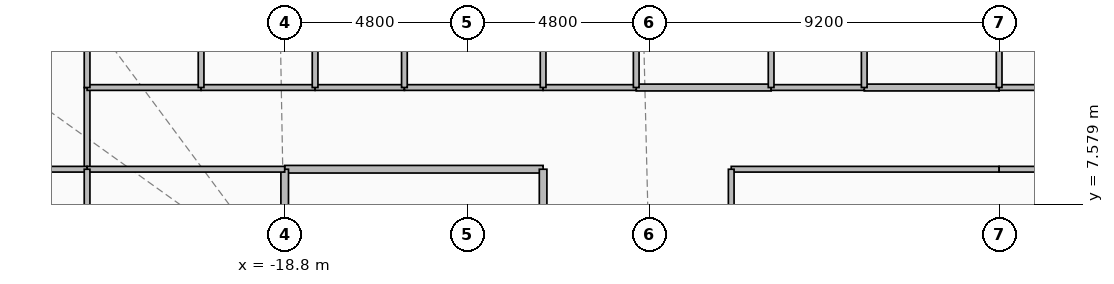
"""IFC4 building model, lengths in metres.
Left out: names, types, materials, properties, quantities, classifications, styles, units other than length and angle.
Written with IfcOpenShell. Run it as: python <this file> out.ifc"""

import sys

from ifc_helpers import new_model, si_unit, direction, frame, frame_2d, origin, place, context, subcontext, project, spatial, rectangle, extrude, element, fill, save


model = new_model("IFC4")
c1 = context("Model", 3, precision=1e-05, world=origin(), true_north=direction((0.0, 1.0)))
c2 = subcontext(c1, "Body", "Model", "MODEL_VIEW")
j1 = project(units=[si_unit("LENGTHUNIT", "METRE"), si_unit("PLANEANGLEUNIT", "RADIAN")], contexts=[c1])
p1 = place(None, origin())
s1 = spatial("IfcSite", under=j1, at=p1, CompositionType="ELEMENT")
p2 = place(p1, origin())
s2 = spatial("IfcBuilding", under=s1, at=p2, CompositionType="ELEMENT")
p3 = place(p2, frame((0.0, 0.0, 22.5)))
s3 = spatial("IfcBuildingStorey", under=s2, at=p3, CompositionType="ELEMENT", Elevation=22.5)
p4 = place(p3, frame((-12.0, 8.5, 0.0), z_axis=(0.0, 0.0, 1.0), x_axis=(-1.0, 0.0, 0.0)))
e1 = element("IfcWall", 1, at=p4, inside=s3, PredefinedType="PARTITIONING", context=c2, shape_type="SweptSolid", body=[
    extrude(rectangle(XDim=6.8, YDim=0.2, at=frame_2d((3.4, 0.0))), origin(), (0.0, 0.0, 1.0), 4.16),
])
p5 = place(p4, frame((1.715, 0.0, 0.0)))
e2 = element("IfcOpeningElement", 2, at=p5, cuts=e1, PredefinedType="OPENING", context=c2, shape_type="SweptSolid", body=[
    extrude(rectangle(XDim=1.1, YDim=2.15, at=frame_2d((0.55, 1.075))), frame((0.0, 0.11, 0.0), z_axis=(0.0, -1.0, 0.0), x_axis=(1.0, 0.0, 0.0)), (0.0, 0.0, 1.0), 0.22),
])
p6 = place(p3, frame((-12.0, 5.6, 0.0), z_axis=(0.0, 0.0, 1.0), x_axis=(0.0, 1.0, 0.0)))
e3 = element("IfcWall", 3, at=p6, inside=s3, PredefinedType="PARTITIONING", context=c2, shape_type="SweptSolid", body=[
    extrude(rectangle(XDim=2.9, YDim=0.2, at=frame_2d((1.45, 0.0))), origin(), (0.0, 0.0, 1.0), 4.16),
])
p7 = place(p3, frame((-18.8, 8.5, 0.0), z_axis=(0.0, 0.0, 1.0), x_axis=(0.0, -1.0, 0.0)))
e4 = element("IfcWall", 4, at=p7, inside=s3, PredefinedType="PARTITIONING", context=c2, shape_type="SweptSolid", body=[
    extrude(rectangle(XDim=2.9, YDim=0.2, at=frame_2d((1.45, 0.0))), origin(), (0.0, 0.0, 1.0), 3.645),
])
p8 = place(p3, frame((-24.0, 8.5, 0.0), z_axis=(0.0, 0.0, 1.0), x_axis=(0.0, 1.0, 0.0)))
e5 = element("IfcWall", 5, at=p8, inside=s3, PredefinedType="PARTITIONING", context=c2, shape_type="SweptSolid", body=[
    extrude(rectangle(XDim=2.15, YDim=0.15, at=frame_2d((1.075, 0.0))), origin(), (0.0, 0.0, 1.0), 4.16),
])
p9 = place(p8, frame((0.625, 0.0, 0.0)))
e6 = element("IfcOpeningElement", 6, at=p9, cuts=e5, PredefinedType="OPENING", context=c2, shape_type="SweptSolid", body=[
    extrude(rectangle(XDim=0.9, YDim=2.1, at=frame_2d((0.45, 1.05))), frame((0.0, 0.085, 0.0), z_axis=(0.0, -1.0, 0.0), x_axis=(1.0, 0.0, 0.0)), (0.0, 0.0, 1.0), 0.17),
])
p10 = place(p3, frame((-18.8, 8.5, 0.0), z_axis=(0.0, 0.0, 1.0), x_axis=(-1.0, 0.0, 0.0)))
e7 = element("IfcWall", 7, at=p10, inside=s3, PredefinedType="PARTITIONING", context=c2, shape_type="SweptSolid", body=[
    extrude(rectangle(XDim=5.2, YDim=0.15, at=frame_2d((2.6, 0.0))), origin(), (0.0, 0.0, 1.0), 4.16),
])
p11 = place(p10, frame((3.196, 0.0, 0.0)))
e8 = element("IfcOpeningElement", 8, at=p11, cuts=e7, PredefinedType="OPENING", context=c2, shape_type="SweptSolid", body=[
    extrude(rectangle(XDim=1.05, YDim=2.15, at=frame_2d((0.525, 1.075))), frame((0.0, 0.085, 0.0), z_axis=(0.0, -1.0, 0.0), x_axis=(1.0, 0.0, 0.0)), (0.0, 0.0, 1.0), 0.17),
])
p12 = place(p3, frame((-24.0, 10.65, 0.0), z_axis=(0.0, 0.0, 1.0), x_axis=(1.0, 0.0, 0.0)))
e9 = element("IfcWall", 9, at=p12, inside=s3, PredefinedType="PARTITIONING", context=c2, shape_type="SweptSolid", body=[
    extrude(rectangle(XDim=3.0, YDim=0.15, at=frame_2d((1.5, 0.0))), origin(), (0.0, 0.0, 1.0), 4.16),
])
p13 = place(p12, frame((0.679, 0.0, 0.0)))
e10 = element("IfcOpeningElement", 10, at=p13, cuts=e9, PredefinedType="OPENING", context=c2, shape_type="SweptSolid", body=[
    extrude(rectangle(XDim=1.05, YDim=2.15, at=frame_2d((0.525, 1.075))), frame((0.0, 0.085, 0.0), z_axis=(0.0, -1.0, 0.0), x_axis=(1.0, 0.0, 0.0)), (0.0, 0.0, 1.0), 0.17),
])
p14 = place(p3, frame((-21.0, 10.65, 0.0), z_axis=(0.0, 0.0, 1.0), x_axis=(1.0, 0.0, 0.0)))
e11 = element("IfcWall", 11, at=p14, inside=s3, PredefinedType="PARTITIONING", context=c2, shape_type="SweptSolid", body=[
    extrude(rectangle(XDim=3.0, YDim=0.15, at=frame_2d((1.5, 0.0))), origin(), (0.0, 0.0, 1.0), 4.16),
])
p15 = place(p14, frame((0.679, 0.0, 0.0)))
e12 = element("IfcOpeningElement", 12, at=p15, cuts=e11, PredefinedType="OPENING", context=c2, shape_type="SweptSolid", body=[
    extrude(rectangle(XDim=1.05, YDim=2.15, at=frame_2d((0.525, 1.075))), frame((0.0, 0.085, 0.0), z_axis=(0.0, -1.0, 0.0), x_axis=(1.0, 0.0, 0.0)), (0.0, 0.0, 1.0), 0.17),
])
p16 = place(p3, frame((-18.0, 10.65, 0.0), z_axis=(0.0, 0.0, 1.0), x_axis=(1.0, 0.0, 0.0)))
e13 = element("IfcWall", 13, at=p16, inside=s3, PredefinedType="PLUMBINGWALL", context=c2, shape_type="SweptSolid", body=[
    extrude(rectangle(XDim=2.35, YDim=0.15, at=frame_2d((1.175, 0.0))), origin(), (0.0, 0.0, 1.0), 4.16),
])
p17 = place(p16, frame((0.834, 0.0, 0.0)))
e14 = element("IfcOpeningElement", 14, at=p17, cuts=e13, PredefinedType="OPENING", context=c2, shape_type="SweptSolid", body=[
    extrude(rectangle(XDim=0.9, YDim=2.1, at=frame_2d((0.45, 1.05))), frame((0.0, 0.085, 0.0), z_axis=(0.0, -1.0, 0.0), x_axis=(1.0, 0.0, 0.0)), (0.0, 0.0, 1.0), 0.17),
])
p18 = place(p3, frame((-15.65, 10.65, 0.0), z_axis=(0.0, 0.0, 1.0), x_axis=(1.0, 0.0, 0.0)))
e15 = element("IfcWall", 15, at=p18, inside=s3, PredefinedType="PARTITIONING", context=c2, shape_type="SweptSolid", body=[
    extrude(rectangle(XDim=3.65, YDim=0.15, at=frame_2d((1.825, 0.0))), origin(), (0.0, 0.0, 1.0), 4.16),
])
p19 = place(p18, frame((1.157, 0.0, 0.0)))
e16 = element("IfcOpeningElement", 16, at=p19, cuts=e15, PredefinedType="OPENING", context=c2, shape_type="SweptSolid", body=[
    extrude(rectangle(XDim=0.95, YDim=2.1, at=frame_2d((0.475, 1.05))), frame((0.0, 0.085, 0.0), z_axis=(0.0, -1.0, 0.0), x_axis=(1.0, 0.0, 0.0)), (0.0, 0.0, 1.0), 0.17),
])
p20 = place(p3, frame((-9.55, 10.65, 0.0), z_axis=(0.0, 0.0, 1.0), x_axis=(1.0, 0.0, 0.0)))
e17 = element("IfcWall", 17, at=p20, inside=s3, PredefinedType="PARTITIONING", context=c2, shape_type="SweptSolid", body=[
    extrude(rectangle(XDim=3.55, YDim=0.18, at=frame_2d((1.775, 0.0))), origin(), (0.0, 0.0, 1.0), 4.16),
])
p21 = place(p20, frame((1.796, 0.0, 0.0)))
e18 = element("IfcOpeningElement", 18, at=p21, cuts=e17, PredefinedType="OPENING", context=c2, shape_type="SweptSolid", body=[
    extrude(rectangle(XDim=1.0, YDim=2.15, at=frame_2d((0.5, 1.075))), frame((0.0, 0.1, 0.0), z_axis=(0.0, -1.0, 0.0), x_axis=(1.0, 0.0, 0.0)), (0.0, 0.0, 1.0), 0.2),
])
p22 = place(p3, frame((-12.0, 10.65, 0.0), z_axis=(0.0, 0.0, 1.0), x_axis=(1.0, 0.0, 0.0)))
e19 = element("IfcWall", 19, at=p22, inside=s3, PredefinedType="PLUMBINGWALL", context=c2, shape_type="SweptSolid", body=[
    extrude(rectangle(XDim=2.45, YDim=0.15, at=frame_2d((1.225, 0.0))), origin(), (0.0, 0.0, 1.0), 4.16),
])
p23 = place(p3, frame((-3.55, 10.65, 0.0), z_axis=(0.0, 0.0, 1.0), x_axis=(1.0, 0.0, 0.0)))
e20 = element("IfcWall", 20, at=p23, inside=s3, PredefinedType="PARTITIONING", context=c2, shape_type="SweptSolid", body=[
    extrude(rectangle(XDim=3.55, YDim=0.18, at=frame_2d((1.775, 0.0))), origin(), (0.0, 0.0, 1.0), 4.16),
])
p24 = place(p23, frame((1.275, 0.0, 0.0)))
e21 = element("IfcOpeningElement", 21, at=p24, cuts=e20, PredefinedType="OPENING", context=c2, shape_type="SweptSolid", body=[
    extrude(rectangle(XDim=1.0, YDim=2.15, at=frame_2d((0.5, 1.075))), frame((0.0, 0.1, 0.0), z_axis=(0.0, -1.0, 0.0), x_axis=(1.0, 0.0, 0.0)), (0.0, 0.0, 1.0), 0.2),
])
p25 = place(p3, frame((-6.0, 10.65, 0.0), z_axis=(0.0, 0.0, 1.0), x_axis=(1.0, 0.0, 0.0)))
e22 = element("IfcWall", 22, at=p25, inside=s3, PredefinedType="PLUMBINGWALL", context=c2, shape_type="SweptSolid", body=[
    extrude(rectangle(XDim=2.45, YDim=0.15, at=frame_2d((1.225, 0.0))), origin(), (0.0, 0.0, 1.0), 4.16),
])
p26 = place(p3, frame((0.0, 8.5, 0.0), z_axis=(0.0, 0.0, 1.0), x_axis=(-1.0, 0.0, 0.0)))
e23 = element("IfcWall", 23, at=p26, inside=s3, PredefinedType="PARTITIONING", context=c2, shape_type="SweptSolid", body=[
    extrude(rectangle(XDim=7.05, YDim=0.15, at=frame_2d((3.525, 0.0))), origin(), (0.0, 0.0, 1.0), 4.16),
])
p27 = place(p3, frame((0.0, 10.65, 0.0), z_axis=(0.0, 0.0, 1.0), x_axis=(1.0, 0.0, 0.0)))
e24 = element("IfcWall", 24, at=p27, inside=s3, PredefinedType="PLUMBINGWALL", context=c2, shape_type="SweptSolid", body=[
    extrude(rectangle(XDim=2.45, YDim=0.15, at=frame_2d((1.225, 0.0))), origin(), (0.0, 0.0, 1.0), 4.16),
])
p28 = place(p3, frame((7.05, 8.5, 0.0), z_axis=(0.0, 0.0, 1.0), x_axis=(-1.0, 0.0, 0.0)))
e25 = element("IfcWall", 25, at=p28, inside=s3, PredefinedType="PARTITIONING", context=c2, shape_type="SweptSolid", body=[
    extrude(rectangle(XDim=7.05, YDim=0.15, at=frame_2d((3.525, 0.0))), origin(), (0.0, 0.0, 1.0), 4.16),
])
p29 = place(p3, frame((-7.05, 8.5, 0.0), z_axis=(0.0, 0.0, 1.0), x_axis=(0.0, -1.0, 0.0)))
e26 = element("IfcWall", 26, at=p29, inside=s3, PredefinedType="PARTITIONING", context=c2, shape_type="SweptSolid", body=[
    extrude(rectangle(XDim=14.1, YDim=0.15, at=frame_2d((7.05, 0.0))), origin(), (0.0, 0.0, 1.0), 4.16),
])
p30 = place(p29, frame((8.011, 0.0, 0.0)))
e27 = element("IfcOpeningElement", 27, at=p30, cuts=e26, PredefinedType="OPENING", context=c2, shape_type="SweptSolid", body=[
    extrude(rectangle(XDim=1.05, YDim=2.15, at=frame_2d((0.525, 1.075))), frame((0.0, 0.085, 0.0), z_axis=(0.0, -1.0, 0.0), x_axis=(1.0, 0.0, 0.0)), (0.0, 0.0, 1.0), 0.17),
])
p31 = place(p3, frame((-26.65, 8.5, 0.0), z_axis=(0.0, 0.0, 1.0), x_axis=(1.0, 0.0, 0.0)))
e28 = element("IfcWall", 28, at=p31, inside=s3, PredefinedType="PARTITIONING", context=c2, shape_type="SweptSolid", body=[
    extrude(rectangle(XDim=2.65, YDim=0.15, at=frame_2d((1.325, 0.0))), origin(), (0.0, 0.0, 1.0), 4.16),
])
p32 = place(p31, frame((0.635, 0.0, 0.0)))
e29 = element("IfcOpeningElement", 29, at=p32, cuts=e28, PredefinedType="OPENING", context=c2, shape_type="SweptSolid", body=[
    extrude(rectangle(XDim=1.05, YDim=2.15, at=frame_2d((0.525, 1.075))), frame((0.0, 0.085, 0.0), z_axis=(0.0, -1.0, 0.0), x_axis=(1.0, 0.0, 0.0)), (0.0, 0.0, 1.0), 0.17),
])
p33 = place(p3, frame((-24.0, 8.5, 0.0), z_axis=(0.0, 0.0, 1.0), x_axis=(0.0, -1.0, 0.0)))
e30 = element("IfcWall", 30, at=p33, inside=s3, PredefinedType="PARTITIONING", context=c2, shape_type="SweptSolid", body=[
    extrude(rectangle(XDim=14.1, YDim=0.15, at=frame_2d((7.05, 0.0))), origin(), (0.0, 0.0, 1.0), 4.16),
])
for number, where, z_axis, x_axis in (
    (31, (-24.0, 24.8, 0.0), (0.0, 0.0, 1.0), (0.0, -1.0, 0.0)),
    (32, (-21.0, 24.8, 0.0), (0.0, 0.0, 1.0), (0.0, -1.0, 0.0)),
):
    element("IfcWall", number, at=place(p3, frame(where, z_axis=z_axis, x_axis=x_axis)), inside=s3, PredefinedType="PARTITIONING", context=c2, shape_type="SweptSolid", body=[
        extrude(rectangle(XDim=14.15, YDim=0.15, at=frame_2d((7.075, 0.0))), origin(), (0.0, 0.0, 1.0), 4.16),
    ])
for number, where, z_axis, x_axis in (
    (33, (-18.0, 24.8, 0.0), (0.0, 0.0, 1.0), (0.0, -1.0, 0.0)),
    (34, (-15.65, 24.8, 0.0), (0.0, 0.0, 1.0), (0.0, -1.0, 0.0)),
):
    element("IfcWall", number, at=place(p3, frame(where, z_axis=z_axis, x_axis=x_axis)), inside=s3, PredefinedType="PLUMBINGWALL", context=c2, shape_type="SweptSolid", body=[
        extrude(rectangle(XDim=14.15, YDim=0.15, at=frame_2d((7.075, 0.0))), origin(), (0.0, 0.0, 1.0), 4.16),
    ])
p34 = place(p3, frame((-12.0, 12.8, 0.0), z_axis=(0.0, 0.0, 1.0), x_axis=(0.0, -1.0, 0.0)))
e35 = element("IfcWall", 35, at=p34, inside=s3, PredefinedType="PLUMBINGWALL", context=c2, shape_type="SweptSolid", body=[
    extrude(rectangle(XDim=2.15, YDim=0.15, at=frame_2d((1.075, 0.0))), origin(), (0.0, 0.0, 1.0), 4.16),
])
p35 = place(p3, frame((-9.55, 10.65, 0.0), z_axis=(0.0, 0.0, 1.0), x_axis=(0.0, 1.0, 0.0)))
e36 = element("IfcWall", 36, at=p35, inside=s3, PredefinedType="PLUMBINGWALL", context=c2, shape_type="SweptSolid", body=[
    extrude(rectangle(XDim=2.15, YDim=0.15, at=frame_2d((1.075, 0.0))), origin(), (0.0, 0.0, 1.0), 3.645),
])
for number, where, z_axis, x_axis in (
    (37, (-6.0, 12.8, 0.0), (0.0, 0.0, 1.0), (0.0, -1.0, 0.0)),
    (38, (-3.55, 10.65, 0.0), (0.0, 0.0, 1.0), (0.0, 1.0, 0.0)),
    (39, (0.0, 12.8, 0.0), (0.0, 0.0, 1.0), (0.0, -1.0, 0.0)),
):
    element("IfcWall", number, at=place(p3, frame(where, z_axis=z_axis, x_axis=x_axis)), inside=s3, PredefinedType="PLUMBINGWALL", context=c2, shape_type="SweptSolid", body=[
        extrude(rectangle(XDim=2.15, YDim=0.15, at=frame_2d((1.075, 0.0))), origin(), (0.0, 0.0, 1.0), 4.16),
    ])
p36 = place(p5, origin())
e40 = element("IfcDoor", 40, at=p36, inside=s3, OperationType="SINGLE_SWING_RIGHT", PredefinedType="DOOR", context=c2, shape_type="SweptSolid", body=[
    extrude(rectangle(XDim=1.1, YDim=2.15, at=frame_2d((0.55, 1.075))), frame((0.0, 0.025, 0.0), z_axis=(0.0, -1.0, 0.0), x_axis=(1.0, 0.0, 0.0)), (0.0, 0.0, 1.0), 0.05),
])
fill(e2, e40)
p37 = place(p9, origin())
e41 = element("IfcDoor", 41, at=p37, inside=s3, OperationType="SINGLE_SWING_LEFT", PredefinedType="DOOR", context=c2, shape_type="SweptSolid", body=[
    extrude(rectangle(XDim=0.9, YDim=2.1, at=frame_2d((0.45, 1.05))), frame((0.0, 0.025, 0.0), z_axis=(0.0, -1.0, 0.0), x_axis=(1.0, 0.0, 0.0)), (0.0, 0.0, 1.0), 0.05),
])
fill(e6, e41)
p38 = place(p11, origin())
e42 = element("IfcDoor", 42, at=p38, inside=s3, OperationType="SINGLE_SWING_RIGHT", PredefinedType="DOOR", context=c2, shape_type="SweptSolid", body=[
    extrude(rectangle(XDim=1.05, YDim=2.15, at=frame_2d((0.525, 1.075))), frame((0.0, 0.025, 0.0), z_axis=(0.0, -1.0, 0.0), x_axis=(1.0, 0.0, 0.0)), (0.0, 0.0, 1.0), 0.05),
])
fill(e8, e42)
p39 = place(p13, origin())
e43 = element("IfcDoor", 43, at=p39, inside=s3, OperationType="SINGLE_SWING_LEFT", PredefinedType="DOOR", context=c2, shape_type="SweptSolid", body=[
    extrude(rectangle(XDim=1.05, YDim=2.15, at=frame_2d((0.525, 1.075))), frame((0.0, 0.025, 0.0), z_axis=(0.0, -1.0, 0.0), x_axis=(1.0, 0.0, 0.0)), (0.0, 0.0, 1.0), 0.05),
])
fill(e10, e43)
p40 = place(p15, origin())
e44 = element("IfcDoor", 44, at=p40, inside=s3, OperationType="SINGLE_SWING_RIGHT", PredefinedType="DOOR", context=c2, shape_type="SweptSolid", body=[
    extrude(rectangle(XDim=1.05, YDim=2.15, at=frame_2d((0.525, 1.075))), frame((0.0, 0.025, 0.0), z_axis=(0.0, -1.0, 0.0), x_axis=(1.0, 0.0, 0.0)), (0.0, 0.0, 1.0), 0.05),
])
fill(e12, e44)
p41 = place(p17, origin())
e45 = element("IfcDoor", 45, at=p41, inside=s3, OperationType="SINGLE_SWING_LEFT", PredefinedType="DOOR", context=c2, shape_type="SweptSolid", body=[
    extrude(rectangle(XDim=0.9, YDim=2.1, at=frame_2d((0.45, 1.05))), frame((0.0, 0.025, 0.0), z_axis=(0.0, -1.0, 0.0), x_axis=(1.0, 0.0, 0.0)), (0.0, 0.0, 1.0), 0.05),
])
fill(e14, e45)
p42 = place(p19, origin())
e46 = element("IfcDoor", 46, at=p42, inside=s3, OperationType="SINGLE_SWING_RIGHT", PredefinedType="DOOR", context=c2, shape_type="SweptSolid", body=[
    extrude(rectangle(XDim=0.95, YDim=2.1, at=frame_2d((0.475, 1.05))), frame((0.0, 0.025, 0.0), z_axis=(0.0, -1.0, 0.0), x_axis=(1.0, 0.0, 0.0)), (0.0, 0.0, 1.0), 0.05),
])
fill(e16, e46)
p43 = place(p21, origin())
e47 = element("IfcDoor", 47, at=p43, inside=s3, OperationType="SINGLE_SWING_LEFT", PredefinedType="DOOR", context=c2, shape_type="SweptSolid", body=[
    extrude(rectangle(XDim=1.0, YDim=2.15, at=frame_2d((0.5, 1.075))), frame((0.0, 0.025, 0.0), z_axis=(0.0, -1.0, 0.0), x_axis=(1.0, 0.0, 0.0)), (0.0, 0.0, 1.0), 0.05),
])
fill(e18, e47)
p44 = place(p24, origin())
e48 = element("IfcDoor", 48, at=p44, inside=s3, OperationType="SINGLE_SWING_RIGHT", PredefinedType="DOOR", context=c2, shape_type="SweptSolid", body=[
    extrude(rectangle(XDim=1.0, YDim=2.15, at=frame_2d((0.5, 1.075))), frame((0.0, 0.025, 0.0), z_axis=(0.0, -1.0, 0.0), x_axis=(1.0, 0.0, 0.0)), (0.0, 0.0, 1.0), 0.05),
])
fill(e21, e48)
save(model, sys.argv[1])
